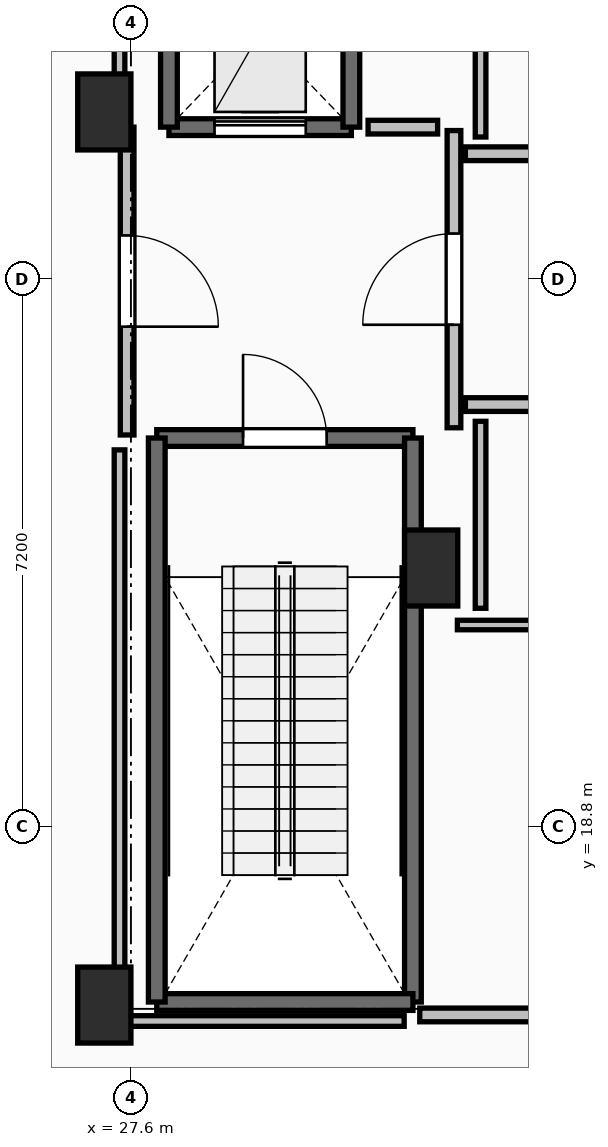
"""IFC4 building model, lengths in metres.
Left out: names, types, materials, properties, quantities, classifications, styles, units other than length and angle.
Written with IfcOpenShell. Run it as: python <this file> out.ifc"""

import sys

from ifc_helpers import new_model, si_unit, direction, frame, frame_2d, origin, origin_2d, place, context, subcontext, project, spatial, rectangle, extrude, element, fill, save


model = new_model("IFC4")
c1 = context("Model", 3, precision=1e-05, world=origin(), true_north=direction((0.0, 1.0)))
c2 = subcontext(c1, "Body", "Model", "MODEL_VIEW")
j1 = project(units=[si_unit("LENGTHUNIT", "METRE"), si_unit("PLANEANGLEUNIT", "RADIAN")], contexts=[c1])
p1 = place(None, origin())
s1 = spatial("IfcSite", under=j1, at=p1, CompositionType="ELEMENT")
p2 = place(p1, origin())
s2 = spatial("IfcBuilding", under=s1, at=p2, CompositionType="ELEMENT")
p3 = place(p2, frame((0.0, 0.0, 285.4)))
s3 = spatial("IfcBuildingStorey", under=s2, at=p3, CompositionType="ELEMENT", Elevation=285.4)
for number, where, z_axis, x_axis in (
    (1, (27.25, 16.45, 0.0), (0.0, 0.0, 1.0), (1.0, 0.0, 0.0)),
    (2, (27.25, 28.2, 0.0), (0.0, 0.0, 1.0), (1.0, 0.0, 0.0)),
    (3, (31.55, 22.2, 0.0), (0.0, 0.0, 1.0), (1.0, 0.0, 0.0)),
):
    element("IfcColumn", number, at=place(p3, frame(where, z_axis=z_axis, x_axis=x_axis)), inside=s3, PredefinedType="PILASTER", context=c2, shape_type="SweptSolid", body=[
        extrude(rectangle(XDim=0.7, YDim=1.0, at=origin_2d()), origin(), (0.0, 0.0, 1.0), 5.0),
    ])
p4 = place(p3, frame((27.94, 23.91, 0.0), z_axis=(0.0, 0.0, 1.0), x_axis=(1.0, 0.0, 0.0)))
e4 = element("IfcWall", 4, at=p4, inside=s3, PredefinedType="SOLIDWALL", context=c2, shape_type="SweptSolid", body=[
    extrude(rectangle(XDim=3.37, YDim=0.22, at=frame_2d((1.685, 0.0))), origin(), (0.0, 0.0, 1.0), 4.69),
])
p5 = place(p4, frame((1.135, 0.0, 0.0)))
e5 = element("IfcOpeningElement", 5, at=p5, cuts=e4, PredefinedType="OPENING", context=c2, shape_type="SweptSolid", body=[
    extrude(rectangle(XDim=1.1, YDim=2.15, at=frame_2d((0.55, 1.075))), frame((0.0, 0.125, 0.0), z_axis=(0.0, -1.0, 0.0), x_axis=(1.0, 0.0, 0.0)), (0.0, 0.0, 1.0), 0.25),
])
p6 = place(p3, frame((31.31, 23.91, 0.0), z_axis=(0.0, 0.0, 1.0), x_axis=(0.0, -1.0, 0.0)))
e6 = element("IfcWall", 6, at=p6, inside=s3, PredefinedType="SOLIDWALL", context=c2, shape_type="SweptSolid", body=[
    extrude(rectangle(XDim=7.42, YDim=0.22, at=frame_2d((3.71, 0.0))), origin(), (0.0, 0.0, 1.0), 4.69),
])
p7 = place(p3, frame((31.31, 16.49, 0.0), z_axis=(0.0, 0.0, 1.0), x_axis=(-1.0, 0.0, 0.0)))
e7 = element("IfcWall", 7, at=p7, inside=s3, PredefinedType="SOLIDWALL", context=c2, shape_type="SweptSolid", body=[
    extrude(rectangle(XDim=3.37, YDim=0.22, at=frame_2d((1.685, 0.0))), origin(), (0.0, 0.0, 1.0), 4.69),
])
p8 = place(p3, frame((27.94, 16.49, 0.0), z_axis=(0.0, 0.0, 1.0), x_axis=(0.0, 1.0, 0.0)))
e8 = element("IfcWall", 8, at=p8, inside=s3, PredefinedType="SOLIDWALL", context=c2, shape_type="SweptSolid", body=[
    extrude(rectangle(XDim=7.42, YDim=0.22, at=frame_2d((3.71, 0.0))), origin(), (0.0, 0.0, 1.0), 4.69),
])
p9 = place(p3, frame((28.1, 28.0, 0.0), z_axis=(0.0, 0.0, 1.0), x_axis=(1.0, 0.0, 0.0)))
e9 = element("IfcWall", 9, at=p9, inside=s3, PredefinedType="SHEAR", context=c2, shape_type="SweptSolid", body=[
    extrude(rectangle(XDim=2.4, YDim=0.22, at=frame_2d((1.2, 0.0))), origin(), (0.0, 0.0, 1.0), 4.69),
])
p10 = place(p9, frame((0.6, 0.0, 0.0)))
e10 = element("IfcOpeningElement", 10, at=p10, cuts=e9, PredefinedType="OPENING", context=c2, shape_type="SweptSolid", body=[
    extrude(rectangle(XDim=1.2, YDim=2.2, at=frame_2d((0.6, 1.1))), frame((0.0, 0.125, 0.0), z_axis=(0.0, -1.0, 0.0), x_axis=(1.0, 0.0, 0.0)), (0.0, 0.0, 1.0), 0.25),
])
for number, where, z_axis, x_axis in (
    (11, (30.5, 28.0, 0.0), (0.0, 0.0, 1.0), (0.0, 1.0, 0.0)),
    (12, (28.1, 30.5, 0.0), (0.0, 0.0, 1.0), (0.0, -1.0, 0.0)),
):
    element("IfcWall", number, at=place(p3, frame(where, z_axis=z_axis, x_axis=x_axis)), inside=s3, PredefinedType="SHEAR", context=c2, shape_type="SweptSolid", body=[
        extrude(rectangle(XDim=2.5, YDim=0.22, at=frame_2d((1.25, 0.0))), origin(), (0.0, 0.0, 1.0), 4.69),
    ])
p11 = place(p3, frame((31.85, 24.045, 0.0), z_axis=(0.0, 0.0, 1.0), x_axis=(0.0, 1.0, 0.0)))
e13 = element("IfcWall", 13, at=p11, inside=s3, PredefinedType="PARTITIONING", context=c2, shape_type="SweptSolid", body=[
    extrude(rectangle(XDim=3.91, YDim=0.18, at=frame_2d((1.955, 0.0))), origin(), (0.0, 0.0, 1.0), 4.69),
])
p12 = place(p11, frame((1.355, 0.0, 0.0)))
e14 = element("IfcOpeningElement", 14, at=p12, cuts=e13, PredefinedType="OPENING", context=c2, shape_type="SweptSolid", body=[
    extrude(rectangle(XDim=1.2, YDim=2.15, at=frame_2d((0.6, 1.075))), frame((0.0, 0.105, 0.0), z_axis=(0.0, -1.0, 0.0), x_axis=(1.0, 0.0, 0.0)), (0.0, 0.0, 1.0), 0.21),
])
p13 = place(p3, frame((27.55, 28.0, 0.0), z_axis=(0.0, 0.0, 1.0), x_axis=(0.0, -1.0, 0.0)))
e15 = element("IfcWall", 15, at=p13, inside=s3, PredefinedType="PARTITIONING", context=c2, shape_type="SweptSolid", body=[
    extrude(rectangle(XDim=4.05, YDim=0.18, at=frame_2d((2.025, 0.0))), origin(), (0.0, 0.0, 1.0), 4.69),
])
p14 = place(p13, frame((1.425, 0.0, 0.0)))
e16 = element("IfcOpeningElement", 16, at=p14, cuts=e15, PredefinedType="OPENING", context=c2, shape_type="SweptSolid", body=[
    extrude(rectangle(XDim=1.2, YDim=2.15, at=frame_2d((0.6, 1.075))), frame((0.0, 0.105, 0.0), z_axis=(0.0, -1.0, 0.0), x_axis=(1.0, 0.0, 0.0)), (0.0, 0.0, 1.0), 0.21),
])
p15 = place(p3, frame((39.19, 27.65, 0.0), z_axis=(0.0, 0.0, 1.0), x_axis=(-1.0, 0.0, 0.0)))
e17 = element("IfcWall", 17, at=p15, inside=s3, PredefinedType="PARTITIONING", context=c2, shape_type="SweptSolid", body=[
    extrude(rectangle(XDim=7.19, YDim=0.18, at=frame_2d((3.595, 0.0))), origin(), (0.0, 0.0, 1.0), 4.69),
])
p16 = place(p15, frame((3.095, 0.0, 0.0)))
e18 = element("IfcOpeningElement", 18, at=p16, cuts=e17, PredefinedType="OPENING", context=c2, shape_type="SweptSolid", body=[
    extrude(rectangle(XDim=1.0, YDim=2.15, at=frame_2d((0.5, 1.075))), frame((0.0, 0.105, 0.0), z_axis=(0.0, -1.0, 0.0), x_axis=(1.0, 0.0, 0.0)), (0.0, 0.0, 1.0), 0.21),
])
p17 = place(p3, frame((32.0, 24.35, 0.0), z_axis=(0.0, 0.0, 1.0), x_axis=(1.0, 0.0, 0.0)))
e19 = element("IfcWall", 19, at=p17, inside=s3, PredefinedType="PARTITIONING", context=c2, shape_type="SweptSolid", body=[
    extrude(rectangle(XDim=3.04, YDim=0.18, at=frame_2d((1.52, 0.0))), origin(), (0.0, 0.0, 1.0), 4.69),
])
p18 = place(p17, frame((1.095, 0.0, 0.0)))
e20 = element("IfcOpeningElement", 20, at=p18, cuts=e19, PredefinedType="OPENING", context=c2, shape_type="SweptSolid", body=[
    extrude(rectangle(XDim=0.85, YDim=2.1, at=frame_2d((0.425, 1.05))), frame((0.0, 0.105, 0.0), z_axis=(0.0, -1.0, 0.0), x_axis=(1.0, 0.0, 0.0)), (0.0, 0.0, 1.0), 0.21),
])
p19 = place(p3, frame((35.005, 21.45, 0.0), z_axis=(0.0, 0.0, 1.0), x_axis=(-1.0, 0.0, 0.0)))
e21 = element("IfcWall", 21, at=p19, inside=s3, PredefinedType="PARTITIONING", context=c2, shape_type="SweptSolid", body=[
    extrude(rectangle(XDim=3.11, YDim=0.125, at=frame_2d((1.555, 0.0))), origin(), (0.0, 0.0, 1.0), 4.69),
])
p20 = place(p3, frame((31.4, 16.32, 0.0), z_axis=(0.0, 0.0, 1.0), x_axis=(1.0, 0.0, 0.0)))
e22 = element("IfcWall", 22, at=p20, inside=s3, PredefinedType="PARTITIONING", context=c2, shape_type="SweptSolid", body=[
    extrude(rectangle(XDim=4.4, YDim=0.18, at=frame_2d((2.2, 0.0))), origin(), (0.0, 0.0, 1.0), 4.69),
])
p21 = place(p20, frame((1.775, 0.0, 0.0)))
e23 = element("IfcOpeningElement", 23, at=p21, cuts=e22, PredefinedType="OPENING", context=c2, shape_type="SweptSolid", body=[
    extrude(rectangle(XDim=0.85, YDim=2.1, at=frame_2d((0.425, 1.05))), frame((0.0, 0.105, 0.0), z_axis=(0.0, -1.0, 0.0), x_axis=(1.0, 0.0, 0.0)), (0.0, 0.0, 1.0), 0.21),
])
p22 = place(p3, frame((31.635, 28.0, 0.0), z_axis=(0.0, 0.0, 1.0), x_axis=(-1.0, 0.0, 0.0)))
e24 = element("IfcWall", 24, at=p22, inside=s3, PredefinedType="PARTITIONING", context=c2, shape_type="SweptSolid", body=[
    extrude(rectangle(XDim=0.915, YDim=0.18, at=frame_2d((0.458, 0.0))), origin(), (0.0, 0.0, 1.0), 4.69),
])
p23 = place(p3, frame((32.2, 30.26, 0.0), z_axis=(0.0, 0.0, 1.0), x_axis=(0.0, -1.0, 0.0)))
e25 = element("IfcWall", 25, at=p23, inside=s3, PredefinedType="PARTITIONING", context=c2, shape_type="SweptSolid", body=[
    extrude(rectangle(XDim=2.39, YDim=0.14, at=frame_2d((1.195, 0.0))), origin(), (0.0, 0.0, 1.0), 4.69),
])
p24 = place(p3, frame((32.2, 24.13, 0.0), z_axis=(0.0, 0.0, 1.0), x_axis=(0.0, -1.0, 0.0)))
e26 = element("IfcWall", 26, at=p24, inside=s3, PredefinedType="PARTITIONING", context=c2, shape_type="SweptSolid", body=[
    extrude(rectangle(XDim=2.46, YDim=0.14, at=frame_2d((1.23, 0.0))), origin(), (0.0, 0.0, 1.0), 3.882),
])
p25 = place(p3, frame((27.45, 33.45, 0.0), z_axis=(0.0, 0.0, 1.0), x_axis=(0.0, -1.0, 0.0)))
e27 = element("IfcWall", 27, at=p25, inside=s3, PredefinedType="PARTITIONING", context=c2, shape_type="SweptSolid", body=[
    extrude(rectangle(XDim=5.254, YDim=0.14, at=frame_2d((2.627, 0.0))), origin(), (0.0, 0.0, 1.0), 3.882),
])
p26 = place(p3, frame((27.45, 23.754, 0.0), z_axis=(0.0, 0.0, 1.0), x_axis=(0.0, -1.0, 0.0)))
e28 = element("IfcWall", 28, at=p26, inside=s3, PredefinedType="PARTITIONING", context=c2, shape_type="SweptSolid", body=[
    extrude(rectangle(XDim=7.514, YDim=0.14, at=frame_2d((3.757, 0.0))), origin(), (0.0, 0.0, 1.0), 3.882),
])
p27 = place(p3, frame((27.45, 16.24, 0.0), z_axis=(0.0, 0.0, 1.0), x_axis=(1.0, 0.0, 0.0)))
e29 = element("IfcWall", 29, at=p27, inside=s3, PredefinedType="PARTITIONING", context=c2, shape_type="SweptSolid", body=[
    extrude(rectangle(XDim=3.745, YDim=0.14, at=frame_2d((1.873, 0.0))), origin(), (0.0, 0.0, 1.0), 3.882),
])
p28 = place(p5, origin())
e30 = element("IfcDoor", 30, at=p28, inside=s3, OperationType="SINGLE_SWING_LEFT", PredefinedType="DOOR", context=c2, shape_type="SweptSolid", body=[
    extrude(rectangle(XDim=1.1, YDim=2.15, at=frame_2d((0.55, 1.075))), frame((0.0, 0.025, 0.0), z_axis=(0.0, -1.0, 0.0), x_axis=(1.0, 0.0, 0.0)), (0.0, 0.0, 1.0), 0.05),
])
fill(e5, e30)
p29 = place(p10, origin())
e31 = element("IfcDoor", 31, at=p29, inside=s3, OperationType="SLIDING_TO_LEFT", PredefinedType="DOOR", context=c2, shape_type="SweptSolid", body=[
    extrude(rectangle(XDim=1.2, YDim=2.2, at=frame_2d((0.6, 1.1))), frame((0.0, 0.025, 0.0), z_axis=(0.0, -1.0, 0.0), x_axis=(1.0, 0.0, 0.0)), (0.0, 0.0, 1.0), 0.05),
])
fill(e10, e31)
p30 = place(p12, origin())
e32 = element("IfcDoor", 32, at=p30, inside=s3, OperationType="SINGLE_SWING_LEFT", PredefinedType="DOOR", context=c2, shape_type="SweptSolid", body=[
    extrude(rectangle(XDim=1.2, YDim=2.15, at=frame_2d((0.6, 1.075))), frame((0.0, 0.025, 0.0), z_axis=(0.0, -1.0, 0.0), x_axis=(1.0, 0.0, 0.0)), (0.0, 0.0, 1.0), 0.05),
])
fill(e14, e32)
p31 = place(p14, origin())
e33 = element("IfcDoor", 33, at=p31, inside=s3, OperationType="SINGLE_SWING_RIGHT", PredefinedType="DOOR", context=c2, shape_type="SweptSolid", body=[
    extrude(rectangle(XDim=1.2, YDim=2.15, at=frame_2d((0.6, 1.075))), frame((0.0, 0.025, 0.0), z_axis=(0.0, -1.0, 0.0), x_axis=(1.0, 0.0, 0.0)), (0.0, 0.0, 1.0), 0.05),
])
fill(e16, e33)
save(model, sys.argv[1])
